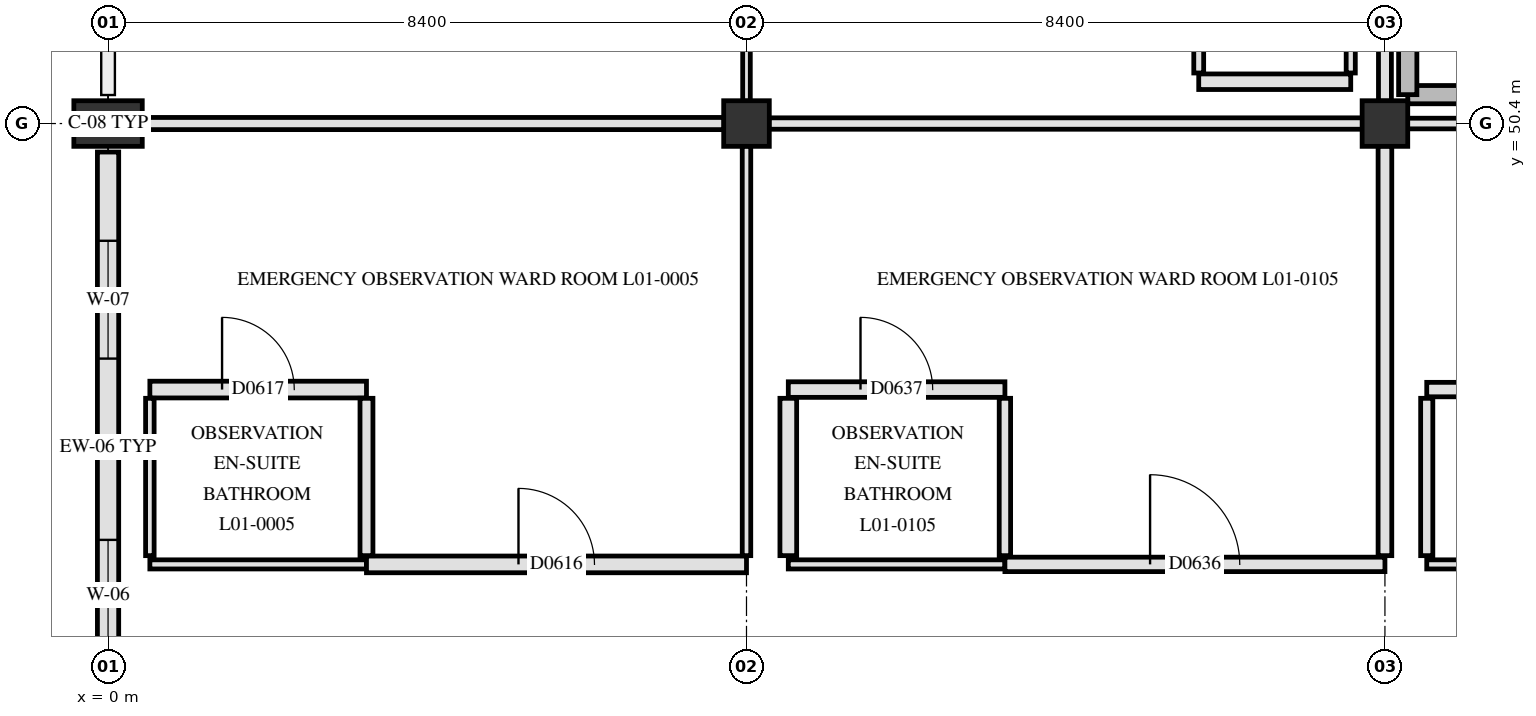
"""IFC4 building model, lengths in metres.
Left out: names, types, materials, properties, quantities, classifications, styles, units other than length and angle.
Written with IfcOpenShell. Run it as: python <this file> out.ifc"""

import sys

from ifc_helpers import new_model, si_unit, direction, frame, frame_2d, origin, origin_2d, place, context, subcontext, project, spatial, rectangle, extrude, element, fill, save


model = new_model("IFC4")
c1 = context("Model", 3, precision=1e-05, world=origin(), true_north=direction((0.0, 1.0)))
c2 = subcontext(c1, "Body", "Model", "MODEL_VIEW")
j1 = project(units=[si_unit("LENGTHUNIT", "METRE"), si_unit("PLANEANGLEUNIT", "RADIAN")], contexts=[c1])
p1 = place(None, origin())
s1 = spatial("IfcSite", under=j1, at=p1, CompositionType="ELEMENT")
p2 = place(p1, origin())
s2 = spatial("IfcBuilding", under=s1, at=p2, CompositionType="ELEMENT")
p3 = place(p2, frame((0.0, 0.0, 4.8)))
s3 = spatial("IfcBuildingStorey", under=s2, at=p3, CompositionType="ELEMENT", Elevation=4.8)
p4 = place(p3, frame((0.0, 50.4, 0.0), z_axis=(0.0, 0.0, 1.0), x_axis=(0.0, 1.0, 0.0)))
e1 = element("IfcColumn", 1, at=p4, inside=s3, PredefinedType="PILASTER", context=c2, shape_type="SweptSolid", body=[
    extrude(rectangle(XDim=0.6, YDim=0.9, at=origin_2d()), origin(), (0.0, 0.0, 1.0), 4.5),
])
for number, where, z_axis, x_axis in (
    (2, (8.4, 50.4, 0.0), (0.0, 0.0, 1.0), (1.0, 0.0, 0.0)),
    (3, (16.8, 50.4, 0.0), (0.0, 0.0, 1.0), (1.0, 0.0, 0.0)),
):
    element("IfcColumn", number, at=place(p3, frame(where, z_axis=z_axis, x_axis=x_axis)), inside=s3, PredefinedType="COLUMN", context=c2, shape_type="SweptSolid", body=[
        extrude(rectangle(XDim=0.6, YDim=0.6, at=origin_2d()), origin(), (0.0, 0.0, 1.0), 4.5),
    ])
p5 = place(p3, frame((0.0, 42.255, 0.0), z_axis=(0.0, 0.0, 1.0), x_axis=(0.0, 1.0, 0.0)))
e4 = element("IfcWall", 4, at=p5, inside=s3, PredefinedType="SOLIDWALL", context=c2, shape_type="SweptSolid", body=[
    extrude(rectangle(XDim=7.77, YDim=0.28, at=frame_2d((3.885, 0.0))), origin(), (0.0, 0.0, 1.0), 3.44),
])
p6 = place(p5, frame((1.218, 0.0, 0.85)))
e5 = element("IfcOpeningElement", 5, at=p6, cuts=e4, PredefinedType="OPENING", context=c2, shape_type="SweptSolid", body=[
    extrude(rectangle(XDim=1.45, YDim=1.3, at=frame_2d((0.725, 0.65))), frame((0.0, 0.15, 0.0), z_axis=(0.0, -1.0, 0.0), x_axis=(1.0, 0.0, 0.0)), (0.0, 0.0, 1.0), 0.3),
])
p7 = place(p5, frame((5.052, 0.0, 0.85)))
e6 = element("IfcOpeningElement", 6, at=p7, cuts=e4, PredefinedType="OPENING", context=c2, shape_type="SweptSolid", body=[
    extrude(rectangle(XDim=1.55, YDim=1.3, at=frame_2d((0.775, 0.65))), frame((0.0, 0.15, 0.0), z_axis=(0.0, -1.0, 0.0), x_axis=(1.0, 0.0, 0.0)), (0.0, 0.0, 1.0), 0.3),
])
p8 = place(p3, frame((17.1, 50.78, 0.0), z_axis=(0.0, 0.0, 1.0), x_axis=(1.0, 0.0, 0.0)))
e7 = element("IfcWall", 7, at=p8, inside=s3, PredefinedType="SHEAR", context=c2, shape_type="SweptSolid", body=[
    extrude(rectangle(XDim=7.82, YDim=0.24, at=frame_2d((3.91, 0.0))), origin(), (0.0, 0.0, 1.0), 4.15),
])
p9 = place(p3, frame((17.1, 50.78, 0.0), z_axis=(0.0, 0.0, 1.0), x_axis=(0.0, 1.0, 0.0)))
e8 = element("IfcWall", 8, at=p9, inside=s3, PredefinedType="SHEAR", context=c2, shape_type="SweptSolid", body=[
    extrude(rectangle(XDim=3.32, YDim=0.24, at=frame_2d((1.66, 0.0))), origin(), (0.0, 0.0, 1.0), 4.15),
])
p10 = place(p3, frame((0.55, 44.6, 0.0), z_axis=(0.0, 0.0, 1.0), x_axis=(1.0, 0.0, 0.0)))
e9 = element("IfcWall", 9, at=p10, inside=s3, PredefinedType="PARTITIONING", context=c2, shape_type="SweptSolid", body=[
    extrude(rectangle(XDim=2.85, YDim=0.12, at=frame_2d((1.425, 0.0))), origin(), (0.0, 0.0, 1.0), 4.14),
])
p11 = place(p3, frame((3.4, 44.6, 0.0), z_axis=(0.0, 0.0, 1.0), x_axis=(1.0, 0.0, 0.0)))
e10 = element("IfcWall", 10, at=p11, inside=s3, PredefinedType="PARTITIONING", context=c2, shape_type="SweptSolid", body=[
    extrude(rectangle(XDim=5.0, YDim=0.22, at=frame_2d((2.5, 0.0))), origin(), (0.0, 0.0, 1.0), 3.59),
])
p12 = place(p11, frame((2.0, 0.0, 0.0)))
e11 = element("IfcOpeningElement", 11, at=p12, cuts=e10, PredefinedType="OPENING", context=c2, shape_type="SweptSolid", body=[
    extrude(rectangle(XDim=1.0, YDim=2.15, at=frame_2d((0.5, 1.075))), frame((0.0, 0.12, 0.0), z_axis=(0.0, -1.0, 0.0), x_axis=(1.0, 0.0, 0.0)), (0.0, 0.0, 1.0), 0.24),
])
p13 = place(p3, frame((8.95, 44.6, 0.0), z_axis=(0.0, 0.0, 1.0), x_axis=(1.0, 0.0, 0.0)))
e12 = element("IfcWall", 12, at=p13, inside=s3, PredefinedType="PARTITIONING", context=c2, shape_type="SweptSolid", body=[
    extrude(rectangle(XDim=2.85, YDim=0.12, at=frame_2d((1.425, 0.0))), origin(), (0.0, 0.0, 1.0), 4.14),
])
p14 = place(p3, frame((11.8, 44.6, 0.0), z_axis=(0.0, 0.0, 1.0), x_axis=(1.0, 0.0, 0.0)))
e13 = element("IfcWall", 13, at=p14, inside=s3, PredefinedType="PARTITIONING", context=c2, shape_type="SweptSolid", body=[
    extrude(rectangle(XDim=5.0, YDim=0.19, at=frame_2d((2.5, 0.0))), origin(), (0.0, 0.0, 1.0), 3.59),
])
p15 = place(p14, frame((1.91, 0.0, 0.0)))
e14 = element("IfcOpeningElement", 14, at=p15, cuts=e13, PredefinedType="OPENING", context=c2, shape_type="SweptSolid", body=[
    extrude(rectangle(XDim=1.18, YDim=2.18, at=frame_2d((0.59, 1.09))), frame((0.0, 0.105, 0.0), z_axis=(0.0, -1.0, 0.0), x_axis=(1.0, 0.0, 0.0)), (0.0, 0.0, 1.0), 0.21),
])
p16 = place(p3, frame((17.35, 44.6, 0.0), z_axis=(0.0, 0.0, 1.0), x_axis=(1.0, 0.0, 0.0)))
e15 = element("IfcWall", 15, at=p16, inside=s3, PredefinedType="PARTITIONING", context=c2, shape_type="SweptSolid", body=[
    extrude(rectangle(XDim=2.85, YDim=0.12, at=frame_2d((1.425, 0.0))), origin(), (0.0, 0.0, 1.0), 4.14),
])
p17 = place(p3, frame((0.55, 46.9, 0.0), z_axis=(0.0, 0.0, 1.0), x_axis=(1.0, 0.0, 0.0)))
e16 = element("IfcWall", 16, at=p17, inside=s3, PredefinedType="PARTITIONING", context=c2, shape_type="SweptSolid", body=[
    extrude(rectangle(XDim=2.85, YDim=0.22, at=frame_2d((1.425, 0.0))), origin(), (0.0, 0.0, 1.0), 4.14),
])
p18 = place(p17, frame((0.95, 0.0, 0.0)))
e17 = element("IfcOpeningElement", 17, at=p18, cuts=e16, PredefinedType="OPENING", context=c2, shape_type="SweptSolid", body=[
    extrude(rectangle(XDim=0.95, YDim=2.1, at=frame_2d((0.475, 1.05))), frame((0.0, 0.12, 0.0), z_axis=(0.0, -1.0, 0.0), x_axis=(1.0, 0.0, 0.0)), (0.0, 0.0, 1.0), 0.24),
])
p19 = place(p3, frame((8.95, 46.9, 0.0), z_axis=(0.0, 0.0, 1.0), x_axis=(1.0, 0.0, 0.0)))
e18 = element("IfcWall", 18, at=p19, inside=s3, PredefinedType="PARTITIONING", context=c2, shape_type="SweptSolid", body=[
    extrude(rectangle(XDim=2.85, YDim=0.205, at=frame_2d((1.425, 0.0))), origin(), (0.0, 0.0, 1.0), 4.14),
])
p20 = place(p19, frame((0.95, 0.0, 0.0)))
e19 = element("IfcOpeningElement", 19, at=p20, cuts=e18, PredefinedType="OPENING", context=c2, shape_type="SweptSolid", body=[
    extrude(rectangle(XDim=0.95, YDim=2.1, at=frame_2d((0.475, 1.05))), frame((0.0, 0.113, 0.0), z_axis=(0.0, -1.0, 0.0), x_axis=(1.0, 0.0, 0.0)), (0.0, 0.0, 1.0), 0.225),
])
p21 = place(p3, frame((17.35, 46.9, 0.0), z_axis=(0.0, 0.0, 1.0), x_axis=(1.0, 0.0, 0.0)))
e20 = element("IfcWall", 20, at=p21, inside=s3, PredefinedType="PARTITIONING", context=c2, shape_type="SweptSolid", body=[
    extrude(rectangle(XDim=2.85, YDim=0.19, at=frame_2d((1.425, 0.0))), origin(), (0.0, 0.0, 1.0), 4.14),
])
p22 = place(p21, frame((0.95, 0.0, 0.0)))
e21 = element("IfcOpeningElement", 21, at=p22, cuts=e20, PredefinedType="OPENING", context=c2, shape_type="SweptSolid", body=[
    extrude(rectangle(XDim=0.95, YDim=2.1, at=frame_2d((0.475, 1.05))), frame((0.0, 0.105, 0.0), z_axis=(0.0, -1.0, 0.0), x_axis=(1.0, 0.0, 0.0)), (0.0, 0.0, 1.0), 0.21),
])
p23 = place(p3, frame((0.295, 50.4, 0.0), z_axis=(0.0, 0.0, 1.0), x_axis=(1.0, 0.0, 0.0)))
e22 = element("IfcWall", 22, at=p23, inside=s3, PredefinedType="PARTITIONING", context=c2, shape_type="SweptSolid", body=[
    extrude(rectangle(XDim=7.81, YDim=0.16, at=frame_2d((3.905, 0.0))), origin(), (0.0, 0.0, 1.0), 3.54),
])
p24 = place(p3, frame((8.695, 50.4, 0.0), z_axis=(0.0, 0.0, 1.0), x_axis=(1.0, 0.0, 0.0)))
e23 = element("IfcWall", 23, at=p24, inside=s3, PredefinedType="PARTITIONING", context=c2, shape_type="SweptSolid", body=[
    extrude(rectangle(XDim=7.81, YDim=0.15, at=frame_2d((3.905, 0.0))), origin(), (0.0, 0.0, 1.0), 3.54),
])
p25 = place(p3, frame((17.095, 50.4, 0.0), z_axis=(0.0, 0.0, 1.0), x_axis=(1.0, 0.0, 0.0)))
e24 = element("IfcWall", 24, at=p25, inside=s3, PredefinedType="PARTITIONING", context=c2, shape_type="SweptSolid", body=[
    extrude(rectangle(XDim=7.81, YDim=0.14, at=frame_2d((3.905, 0.0))), origin(), (0.0, 0.0, 1.0), 3.54),
])
p26 = place(p3, frame((14.35, 50.95, 0.0), z_axis=(0.0, 0.0, 1.0), x_axis=(1.0, 0.0, 0.0)))
e25 = element("IfcWall", 25, at=p26, inside=s3, PredefinedType="PARTITIONING", context=c2, shape_type="SweptSolid", body=[
    extrude(rectangle(XDim=2.0, YDim=0.205, at=frame_2d((1.0, 0.0))), origin(), (0.0, 0.0, 1.0), 4.14),
])
p27 = place(p3, frame((0.55, 44.715, 0.0), z_axis=(0.0, 0.0, 1.0), x_axis=(0.0, 1.0, 0.0)))
e26 = element("IfcWall", 26, at=p27, inside=s3, PredefinedType="PARTITIONING", context=c2, shape_type="SweptSolid", body=[
    extrude(rectangle(XDim=2.07, YDim=0.112, at=frame_2d((1.035, 0.0))), origin(), (0.0, 0.0, 1.0), 4.14),
])
p28 = place(p3, frame((3.4, 44.715, 0.0), z_axis=(0.0, 0.0, 1.0), x_axis=(0.0, 1.0, 0.0)))
e27 = element("IfcWall", 27, at=p28, inside=s3, PredefinedType="PARTITIONING", context=c2, shape_type="SweptSolid", body=[
    extrude(rectangle(XDim=2.07, YDim=0.17, at=frame_2d((1.035, 0.0))), origin(), (0.0, 0.0, 1.0), 4.14),
])
p29 = place(p3, frame((8.4, 44.715, 0.0), z_axis=(0.0, 0.0, 1.0), x_axis=(0.0, 1.0, 0.0)))
e28 = element("IfcWall", 28, at=p29, inside=s3, PredefinedType="PARTITIONING", context=c2, shape_type="SweptSolid", body=[
    extrude(rectangle(XDim=5.39, YDim=0.112, at=frame_2d((2.695, 0.0))), origin(), (0.0, 0.0, 1.0), 3.59),
])
p30 = place(p3, frame((8.4, 50.695, 0.0), z_axis=(0.0, 0.0, 1.0), x_axis=(0.0, 1.0, 0.0)))
e29 = element("IfcWall", 29, at=p30, inside=s3, PredefinedType="PARTITIONING", context=c2, shape_type="SweptSolid", body=[
    extrude(rectangle(XDim=7.81, YDim=0.1, at=frame_2d((3.905, 0.0))), origin(), (0.0, 0.0, 1.0), 3.59),
])
p31 = place(p3, frame((8.95, 44.715, 0.0), z_axis=(0.0, 0.0, 1.0), x_axis=(0.0, 1.0, 0.0)))
e30 = element("IfcWall", 30, at=p31, inside=s3, PredefinedType="PARTITIONING", context=c2, shape_type="SweptSolid", body=[
    extrude(rectangle(XDim=2.07, YDim=0.22, at=frame_2d((1.035, 0.0))), origin(), (0.0, 0.0, 1.0), 4.14),
])
p32 = place(p3, frame((11.8, 44.715, 0.0), z_axis=(0.0, 0.0, 1.0), x_axis=(0.0, 1.0, 0.0)))
e31 = element("IfcWall", 31, at=p32, inside=s3, PredefinedType="PARTITIONING", context=c2, shape_type="SweptSolid", body=[
    extrude(rectangle(XDim=2.07, YDim=0.15, at=frame_2d((1.035, 0.0))), origin(), (0.0, 0.0, 1.0), 4.14),
])
p33 = place(p3, frame((14.35, 51.065, 0.0), z_axis=(0.0, 0.0, 1.0), x_axis=(0.0, 1.0, 0.0)))
e32 = element("IfcWall", 32, at=p33, inside=s3, PredefinedType="PARTITIONING", context=c2, shape_type="SweptSolid", body=[
    extrude(rectangle(XDim=7.62, YDim=0.13, at=frame_2d((3.81, 0.0))), origin(), (0.0, 0.0, 1.0), 3.54),
])
p34 = place(p3, frame((16.35, 51.065, 0.0), z_axis=(0.0, 0.0, 1.0), x_axis=(0.0, 1.0, 0.0)))
e33 = element("IfcWall", 33, at=p34, inside=s3, PredefinedType="PARTITIONING", context=c2, shape_type="SweptSolid", body=[
    extrude(rectangle(XDim=7.735, YDim=0.12, at=frame_2d((3.868, 0.0))), origin(), (0.0, 0.0, 1.0), 3.54),
])
p35 = place(p3, frame((16.8, 44.715, 0.0), z_axis=(0.0, 0.0, 1.0), x_axis=(0.0, 1.0, 0.0)))
e34 = element("IfcWall", 34, at=p35, inside=s3, PredefinedType="PARTITIONING", context=c2, shape_type="SweptSolid", body=[
    extrude(rectangle(XDim=5.39, YDim=0.18, at=frame_2d((2.695, 0.0))), origin(), (0.0, 0.0, 1.0), 3.59),
])
p36 = place(p3, frame((16.8, 50.695, 0.0), z_axis=(0.0, 0.0, 1.0), x_axis=(0.0, 1.0, 0.0)))
e35 = element("IfcWall", 35, at=p36, inside=s3, PredefinedType="PARTITIONING", context=c2, shape_type="SweptSolid", body=[
    extrude(rectangle(XDim=7.81, YDim=0.17, at=frame_2d((3.905, 0.0))), origin(), (0.0, 0.0, 1.0), 3.59),
])
p37 = place(p3, frame((17.35, 44.715, 0.0), z_axis=(0.0, 0.0, 1.0), x_axis=(0.0, 1.0, 0.0)))
e36 = element("IfcWall", 36, at=p37, inside=s3, PredefinedType="PARTITIONING", context=c2, shape_type="SweptSolid", body=[
    extrude(rectangle(XDim=2.07, YDim=0.16, at=frame_2d((1.035, 0.0))), origin(), (0.0, 0.0, 1.0), 4.14),
])
p38 = place(p6, origin())
e37 = element("IfcWindow", 37, at=p38, inside=s3, PartitioningType="SINGLE_PANEL", PredefinedType="WINDOW", context=c2, shape_type="SweptSolid", body=[
    extrude(rectangle(XDim=1.45, YDim=1.3, at=frame_2d((0.725, 0.65))), frame((0.0, 0.03, 0.0), z_axis=(0.0, -1.0, 0.0), x_axis=(1.0, 0.0, 0.0)), (0.0, 0.0, 1.0), 0.06),
])
fill(e5, e37)
p39 = place(p7, origin())
e38 = element("IfcWindow", 38, at=p39, inside=s3, PartitioningType="SINGLE_PANEL", PredefinedType="WINDOW", context=c2, shape_type="SweptSolid", body=[
    extrude(rectangle(XDim=1.55, YDim=1.3, at=frame_2d((0.775, 0.65))), frame((0.0, 0.03, 0.0), z_axis=(0.0, -1.0, 0.0), x_axis=(1.0, 0.0, 0.0)), (0.0, 0.0, 1.0), 0.06),
])
fill(e6, e38)
p40 = place(p12, origin())
e39 = element("IfcDoor", 39, at=p40, inside=s3, OperationType="SINGLE_SWING_LEFT", PredefinedType="DOOR", context=c2, shape_type="SweptSolid", body=[
    extrude(rectangle(XDim=1.0, YDim=2.15, at=frame_2d((0.5, 1.075))), frame((0.0, 0.025, 0.0), z_axis=(0.0, -1.0, 0.0), x_axis=(1.0, 0.0, 0.0)), (0.0, 0.0, 1.0), 0.05),
])
fill(e11, e39)
p41 = place(p18, origin())
e40 = element("IfcDoor", 40, at=p41, inside=s3, OperationType="SINGLE_SWING_LEFT", PredefinedType="DOOR", context=c2, shape_type="SweptSolid", body=[
    extrude(rectangle(XDim=0.95, YDim=2.1, at=frame_2d((0.475, 1.05))), frame((0.0, 0.025, 0.0), z_axis=(0.0, -1.0, 0.0), x_axis=(1.0, 0.0, 0.0)), (0.0, 0.0, 1.0), 0.05),
])
fill(e17, e40)
p42 = place(p15, origin())
e41 = element("IfcDoor", 41, at=p42, inside=s3, OperationType="SINGLE_SWING_LEFT", PredefinedType="DOOR", context=c2, shape_type="SweptSolid", body=[
    extrude(rectangle(XDim=1.18, YDim=2.18, at=frame_2d((0.59, 1.09))), frame((0.0, 0.025, 0.0), z_axis=(0.0, -1.0, 0.0), x_axis=(1.0, 0.0, 0.0)), (0.0, 0.0, 1.0), 0.05),
])
fill(e14, e41)
p43 = place(p20, origin())
e42 = element("IfcDoor", 42, at=p43, inside=s3, OperationType="SINGLE_SWING_LEFT", PredefinedType="DOOR", context=c2, shape_type="SweptSolid", body=[
    extrude(rectangle(XDim=0.95, YDim=2.1, at=frame_2d((0.475, 1.05))), frame((0.0, 0.025, 0.0), z_axis=(0.0, -1.0, 0.0), x_axis=(1.0, 0.0, 0.0)), (0.0, 0.0, 1.0), 0.05),
])
fill(e19, e42)
save(model, sys.argv[1])
